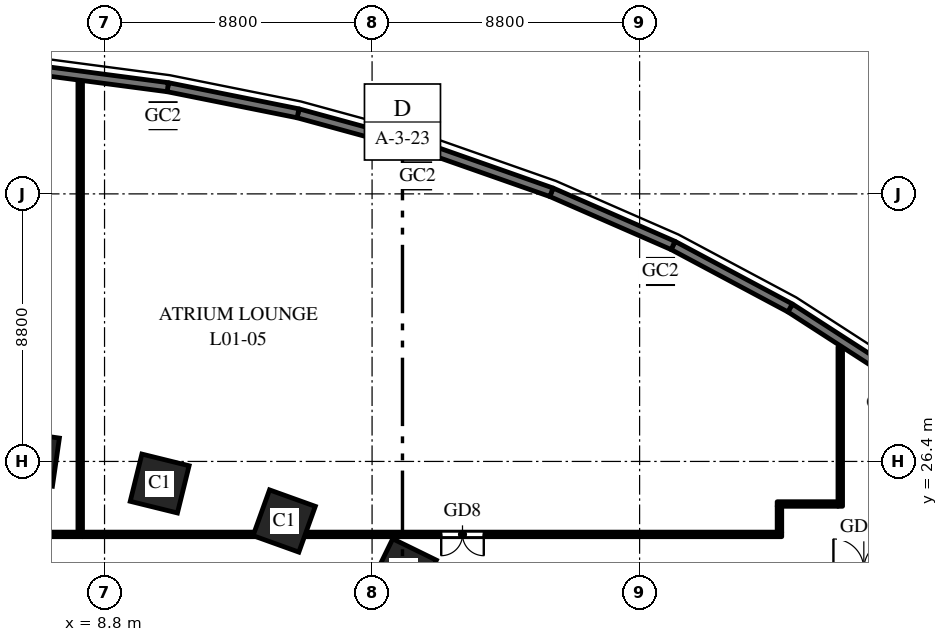
"""IFC4 building model, lengths in metres.
Left out: names, types, materials, properties, quantities, classifications, styles, units other than length and angle.
Written with IfcOpenShell. Run it as: python <this file> out.ifc"""

import sys

from ifc_helpers import new_model, si_unit, direction, frame, frame_2d, origin, origin_2d, place, context, subcontext, project, spatial, rectangle, hollow_rectangle, extrude, element, fill, save


model = new_model("IFC4")
c1 = context("Model", 3, precision=1e-05, world=origin(), true_north=direction((0.0, 1.0)))
c2 = subcontext(c1, "Body", "Model", "MODEL_VIEW")
j1 = project(units=[si_unit("LENGTHUNIT", "METRE"), si_unit("PLANEANGLEUNIT", "RADIAN")], contexts=[c1])
p1 = place(None, origin())
s1 = spatial("IfcSite", under=j1, at=p1, CompositionType="ELEMENT")
p2 = place(p1, origin())
s2 = spatial("IfcBuilding", under=s1, at=p2, CompositionType="ELEMENT")
p3 = place(p2, frame((0.0, 0.0, 7.5)))
s3 = spatial("IfcBuildingStorey", under=s2, at=p3, CompositionType="ELEMENT", Elevation=7.5)
for number, where, z_axis, x_axis in (
    (1, (18.646, 22.785, 0.0), (0.0, 0.0, 1.0), (-0.898, 0.439, 0.0)),
    (2, (14.709, 24.441, 0.0), (0.0, 0.0, 1.0), (-0.941, 0.338, 0.0)),
    (3, (10.613, 25.674, 0.0), (0.0, 0.0, 1.0), (-0.971, 0.24, 0.0)),
    (4, (6.409, 26.491, 0.0), (0.0, 0.0, 1.0), (-0.99, 0.143, 0.0)),
):
    element("IfcColumn", number, at=place(p3, frame(where, z_axis=z_axis, x_axis=x_axis)), inside=s3, PredefinedType="COLUMN", context=c2, shape_type="SweptSolid", body=[
        extrude(rectangle(XDim=1.6, YDim=1.6, at=origin_2d()), origin(), (0.0, 0.0, 1.0), 6.0),
    ])
for number, where, z_axis, x_axis in (
    (5, (27.087, 32.648, 0.0), (0.0, 0.0, 1.0), (1.0, 0.0, 0.0)),
    (6, (19.097, 35.792, 0.0), (0.0, 0.0, 1.0), (1.0, 0.0, 0.0)),
    (7, (10.725, 37.771, 0.0), (0.0, 0.0, 1.0), (1.0, 0.0, 0.0)),
):
    element("IfcColumn", number, at=place(p3, frame(where, z_axis=z_axis, x_axis=x_axis)), inside=s3, PredefinedType="COLUMN", context=c2, shape_type="SweptSolid", body=[
        extrude(hollow_rectangle(XDim=0.8, YDim=0.8, WallThickness=0.04, at=origin_2d()), origin(), (0.0, 0.0, 1.0), 6.0),
    ])
p4 = place(p3, frame((8.0, 38.934, 0.0), z_axis=(0.0, 0.0, 1.0), x_axis=(0.0, -1.0, 0.0)))
e8 = element("IfcWall", 8, at=p4, inside=s3, PredefinedType="PARTITIONING", context=c2, shape_type="SweptSolid", body=[
    extrude(rectangle(XDim=14.859, YDim=0.15, at=frame_2d((7.43, 0.0))), origin(), (0.0, 0.0, 1.0), 4.75),
])
p5 = place(p3, frame((8.075, 24.0, 0.0), z_axis=(0.0, 0.0, 1.0), x_axis=(-1.0, 0.0, 0.0)))
e9 = element("IfcWall", 9, at=p5, inside=s3, PredefinedType="PARTITIONING", context=c2, shape_type="SweptSolid", body=[
    extrude(rectangle(XDim=42.15, YDim=0.15, at=frame_2d((21.075, 0.0))), origin(), (0.0, 0.0, 1.0), 4.75),
])
p6 = place(p5, frame((19.875, 0.0, 0.0)))
e10 = element("IfcOpeningElement", 10, at=p6, cuts=e9, PredefinedType="OPENING", context=c2, shape_type="SweptSolid", body=[
    extrude(rectangle(XDim=1.4, YDim=2.1, at=frame_2d((0.7, 1.05))), frame((0.0, 0.085, 0.0), z_axis=(0.0, -1.0, 0.0), x_axis=(1.0, 0.0, 0.0)), (0.0, 0.0, 1.0), 0.17),
])
p7 = place(p3, frame((31.0, 24.925, 0.0), z_axis=(0.0, 0.0, 1.0), x_axis=(0.0, -1.0, 0.0)))
e11 = element("IfcWall", 11, at=p7, inside=s3, PredefinedType="PARTITIONING", context=c2, shape_type="SweptSolid", body=[
    extrude(rectangle(XDim=0.85, YDim=0.15, at=frame_2d((0.425, 0.0))), origin(), (0.0, 0.0, 1.0), 5.75),
])
p8 = place(p3, frame((31.075, 24.0, 0.0), z_axis=(0.0, 0.0, 1.0), x_axis=(-1.0, 0.0, 0.0)))
e12 = element("IfcWall", 12, at=p8, inside=s3, PredefinedType="PARTITIONING", context=c2, shape_type="SweptSolid", body=[
    extrude(rectangle(XDim=23.001, YDim=0.15, at=frame_2d((11.5, 0.0))), origin(), (0.0, 0.0, 1.0), 4.75),
])
p9 = place(p8, frame((9.801, 0.0, 0.0)))
e13 = element("IfcOpeningElement", 13, at=p9, cuts=e12, PredefinedType="OPENING", context=c2, shape_type="SweptSolid", body=[
    extrude(rectangle(XDim=1.4, YDim=2.1, at=frame_2d((0.7, 1.05))), frame((0.0, 0.085, 0.0), z_axis=(0.0, -1.0, 0.0), x_axis=(1.0, 0.0, 0.0)), (0.0, 0.0, 1.0), 0.17),
])
p10 = place(p3, frame((33.0, 30.165, 0.0), z_axis=(0.0, 0.0, 1.0), x_axis=(0.0, -1.0, 0.0)))
e14 = element("IfcWall", 14, at=p10, inside=s3, PredefinedType="PARTITIONING", context=c2, shape_type="SweptSolid", body=[
    extrude(rectangle(XDim=5.24, YDim=0.15, at=frame_2d((2.62, 0.0))), origin(), (0.0, 0.0, 1.0), 4.75),
])
p11 = place(p3, frame((32.925, 25.0, 0.0), z_axis=(0.0, 0.0, 1.0), x_axis=(-1.0, 0.0, 0.0)))
e15 = element("IfcWall", 15, at=p11, inside=s3, PredefinedType="PARTITIONING", context=c2, shape_type="SweptSolid", body=[
    extrude(rectangle(XDim=2.0, YDim=0.15, at=frame_2d((1.0, 0.0))), origin(), (0.0, 0.0, 1.0), 5.75),
])
p12 = place(p3, frame((35.016, 29.082, 0.0), z_axis=(0.0, 0.0, 1.0), x_axis=(-0.840047348843, 0.542513088969, 0.0)))
e16 = element("IfcWall", 16, at=p12, inside=s3, PredefinedType="SOLIDWALL", context=c2, shape_type="SweptSolid", body=[
    extrude(rectangle(XDim=4.362, YDim=0.3, at=frame_2d((2.181, 0.0))), origin(), (0.0, 0.0, 1.0), 5.75),
])
p13 = place(p12, frame((0.981, 0.0, 1.0)))
e17 = element("IfcOpeningElement", 17, at=p13, cuts=e16, PredefinedType="OPENING", context=c2, shape_type="SweptSolid", body=[
    extrude(rectangle(XDim=2.4, YDim=3.0, at=frame_2d((1.2, 1.5))), frame((0.0, 0.16, 0.0), z_axis=(0.0, -1.0, 0.0), x_axis=(1.0, 0.0, 0.0)), (0.0, 0.0, 1.0), 0.32),
])
p14 = place(p3, frame((31.352, 31.448, 0.0), z_axis=(0.0, 0.0, 1.0), x_axis=(-0.882159305704, 0.47095112205, 0.0)))
e18 = element("IfcWall", 18, at=p14, inside=s3, PredefinedType="SOLIDWALL", context=c2, shape_type="SweptSolid", body=[
    extrude(rectangle(XDim=4.365, YDim=0.3, at=frame_2d((2.182, 0.0))), origin(), (0.0, 0.0, 1.0), 5.75),
])
p15 = place(p14, frame((0.982, 0.0, 1.0)))
e19 = element("IfcOpeningElement", 19, at=p15, cuts=e18, PredefinedType="OPENING", context=c2, shape_type="SweptSolid", body=[
    extrude(rectangle(XDim=2.4, YDim=3.0, at=frame_2d((1.2, 1.5))), frame((0.0, 0.16, 0.0), z_axis=(0.0, -1.0, 0.0), x_axis=(1.0, 0.0, 0.0)), (0.0, 0.0, 1.0), 0.32),
])
p16 = place(p3, frame((27.501, 33.504, 0.0), z_axis=(0.0, 0.0, 1.0), x_axis=(-0.916336904548, 0.400408138483, 0.0)))
e20 = element("IfcWall", 20, at=p16, inside=s3, PredefinedType="SOLIDWALL", context=c2, shape_type="SweptSolid", body=[
    extrude(rectangle(XDim=4.366, YDim=0.3, at=frame_2d((2.183, 0.0))), origin(), (0.0, 0.0, 1.0), 5.75),
])
p17 = place(p16, frame((0.983, 0.0, 1.0)))
e21 = element("IfcOpeningElement", 21, at=p17, cuts=e20, PredefinedType="OPENING", context=c2, shape_type="SweptSolid", body=[
    extrude(rectangle(XDim=2.4, YDim=3.0, at=frame_2d((1.2, 1.5))), frame((0.0, 0.16, 0.0), z_axis=(0.0, -1.0, 0.0), x_axis=(1.0, 0.0, 0.0)), (0.0, 0.0, 1.0), 0.32),
])
p18 = place(p3, frame((23.5, 35.252, 0.0), z_axis=(0.0, 0.0, 1.0), x_axis=(-0.943526738033, 0.331296384853, 0.0)))
e22 = element("IfcWall", 22, at=p18, inside=s3, PredefinedType="SOLIDWALL", context=c2, shape_type="SweptSolid", body=[
    extrude(rectangle(XDim=4.368, YDim=0.3, at=frame_2d((2.184, 0.0))), origin(), (0.0, 0.0, 1.0), 5.75),
])
p19 = place(p18, frame((0.984, 0.0, 1.0)))
e23 = element("IfcOpeningElement", 23, at=p19, cuts=e22, PredefinedType="OPENING", context=c2, shape_type="SweptSolid", body=[
    extrude(rectangle(XDim=2.4, YDim=3.0, at=frame_2d((1.2, 1.5))), frame((0.0, 0.16, 0.0), z_axis=(0.0, -1.0, 0.0), x_axis=(1.0, 0.0, 0.0)), (0.0, 0.0, 1.0), 0.32),
])
p20 = place(p3, frame((19.379, 36.699, 0.0), z_axis=(0.0, 0.0, 1.0), x_axis=(-0.964679950239, 0.263424739931, 0.0)))
e24 = element("IfcWall", 24, at=p20, inside=s3, PredefinedType="SOLIDWALL", context=c2, shape_type="SweptSolid", body=[
    extrude(rectangle(XDim=4.369, YDim=0.3, at=frame_2d((2.185, 0.0))), origin(), (0.0, 0.0, 1.0), 5.75),
])
p21 = place(p20, frame((0.985, 0.0, 1.0)))
e25 = element("IfcOpeningElement", 25, at=p21, cuts=e24, PredefinedType="OPENING", context=c2, shape_type="SweptSolid", body=[
    extrude(rectangle(XDim=2.4, YDim=3.0, at=frame_2d((1.2, 1.5))), frame((0.0, 0.16, 0.0), z_axis=(0.0, -1.0, 0.0), x_axis=(1.0, 0.0, 0.0)), (0.0, 0.0, 1.0), 0.32),
])
p22 = place(p3, frame((15.165, 37.85, 0.0), z_axis=(0.0, 0.0, 1.0), x_axis=(-0.980494629762, 0.196545875071, 0.0)))
e26 = element("IfcWall", 26, at=p22, inside=s3, PredefinedType="SOLIDWALL", context=c2, shape_type="SweptSolid", body=[
    extrude(rectangle(XDim=4.37, YDim=0.3, at=frame_2d((2.185, 0.0))), origin(), (0.0, 0.0, 1.0), 5.75),
])
p23 = place(p22, frame((0.985, 0.0, 1.0)))
e27 = element("IfcOpeningElement", 27, at=p23, cuts=e26, PredefinedType="OPENING", context=c2, shape_type="SweptSolid", body=[
    extrude(rectangle(XDim=2.4, YDim=3.0, at=frame_2d((1.2, 1.5))), frame((0.0, 0.16, 0.0), z_axis=(0.0, -1.0, 0.0), x_axis=(1.0, 0.0, 0.0)), (0.0, 0.0, 1.0), 0.32),
])
p24 = place(p3, frame((10.88, 38.709, 0.0), z_axis=(0.0, 0.0, 1.0), x_axis=(-0.991441741932, 0.130549884544, 0.0)))
e28 = element("IfcWall", 28, at=p24, inside=s3, PredefinedType="SOLIDWALL", context=c2, shape_type="SweptSolid", body=[
    extrude(rectangle(XDim=4.37, YDim=0.3, at=frame_2d((2.185, 0.0))), origin(), (0.0, 0.0, 1.0), 5.75),
])
p25 = place(p24, frame((0.305, 0.0, 1.0)))
e29 = element("IfcOpeningElement", 29, at=p25, cuts=e28, PredefinedType="OPENING", context=c2, shape_type="SweptSolid", body=[
    extrude(rectangle(XDim=2.4, YDim=3.0, at=frame_2d((1.2, 1.5))), frame((0.0, 0.16, 0.0), z_axis=(0.0, -1.0, 0.0), x_axis=(1.0, 0.0, 0.0)), (0.0, 0.0, 1.0), 0.32),
])
p26 = place(p9, origin())
e30 = element("IfcDoor", 30, at=p26, inside=s3, OperationType="DOUBLE_DOOR_SINGLE_SWING", PredefinedType="DOOR", context=c2, shape_type="SweptSolid", body=[
    extrude(rectangle(XDim=1.4, YDim=2.1, at=frame_2d((0.7, 1.05))), frame((0.0, 0.025, 0.0), z_axis=(0.0, -1.0, 0.0), x_axis=(1.0, 0.0, 0.0)), (0.0, 0.0, 1.0), 0.05),
])
fill(e13, e30)
p27 = place(p13, origin())
e31 = element("IfcWindow", 31, at=p27, inside=s3, PartitioningType="SINGLE_PANEL", PredefinedType="WINDOW", context=c2, shape_type="SweptSolid", body=[
    extrude(rectangle(XDim=2.4, YDim=3.0, at=frame_2d((1.2, 1.5))), frame((0.0, 0.03, 0.0), z_axis=(0.0, -1.0, 0.0), x_axis=(1.0, 0.0, 0.0)), (0.0, 0.0, 1.0), 0.06),
])
fill(e17, e31)
p28 = place(p15, origin())
e32 = element("IfcWindow", 32, at=p28, inside=s3, PartitioningType="SINGLE_PANEL", PredefinedType="WINDOW", context=c2, shape_type="SweptSolid", body=[
    extrude(rectangle(XDim=2.4, YDim=3.0, at=frame_2d((1.2, 1.5))), frame((0.0, 0.03, 0.0), z_axis=(0.0, -1.0, 0.0), x_axis=(1.0, 0.0, 0.0)), (0.0, 0.0, 1.0), 0.06),
])
fill(e19, e32)
p29 = place(p17, origin())
e33 = element("IfcWindow", 33, at=p29, inside=s3, PartitioningType="SINGLE_PANEL", PredefinedType="WINDOW", context=c2, shape_type="SweptSolid", body=[
    extrude(rectangle(XDim=2.4, YDim=3.0, at=frame_2d((1.2, 1.5))), frame((0.0, 0.03, 0.0), z_axis=(0.0, -1.0, 0.0), x_axis=(1.0, 0.0, 0.0)), (0.0, 0.0, 1.0), 0.06),
])
fill(e21, e33)
p30 = place(p19, origin())
e34 = element("IfcWindow", 34, at=p30, inside=s3, PartitioningType="SINGLE_PANEL", PredefinedType="WINDOW", context=c2, shape_type="SweptSolid", body=[
    extrude(rectangle(XDim=2.4, YDim=3.0, at=frame_2d((1.2, 1.5))), frame((0.0, 0.03, 0.0), z_axis=(0.0, -1.0, 0.0), x_axis=(1.0, 0.0, 0.0)), (0.0, 0.0, 1.0), 0.06),
])
fill(e23, e34)
p31 = place(p21, origin())
e35 = element("IfcWindow", 35, at=p31, inside=s3, PartitioningType="SINGLE_PANEL", PredefinedType="WINDOW", context=c2, shape_type="SweptSolid", body=[
    extrude(rectangle(XDim=2.4, YDim=3.0, at=frame_2d((1.2, 1.5))), frame((0.0, 0.03, 0.0), z_axis=(0.0, -1.0, 0.0), x_axis=(1.0, 0.0, 0.0)), (0.0, 0.0, 1.0), 0.06),
])
fill(e25, e35)
p32 = place(p23, origin())
e36 = element("IfcWindow", 36, at=p32, inside=s3, PartitioningType="SINGLE_PANEL", PredefinedType="WINDOW", context=c2, shape_type="SweptSolid", body=[
    extrude(rectangle(XDim=2.4, YDim=3.0, at=frame_2d((1.2, 1.5))), frame((0.0, 0.03, 0.0), z_axis=(0.0, -1.0, 0.0), x_axis=(1.0, 0.0, 0.0)), (0.0, 0.0, 1.0), 0.06),
])
fill(e27, e36)
p33 = place(p25, origin())
e37 = element("IfcWindow", 37, at=p33, inside=s3, PartitioningType="SINGLE_PANEL", PredefinedType="WINDOW", context=c2, shape_type="SweptSolid", body=[
    extrude(rectangle(XDim=2.4, YDim=3.0, at=frame_2d((1.2, 1.5))), frame((0.0, 0.03, 0.0), z_axis=(0.0, -1.0, 0.0), x_axis=(1.0, 0.0, 0.0)), (0.0, 0.0, 1.0), 0.06),
])
fill(e29, e37)
save(model, sys.argv[1])
